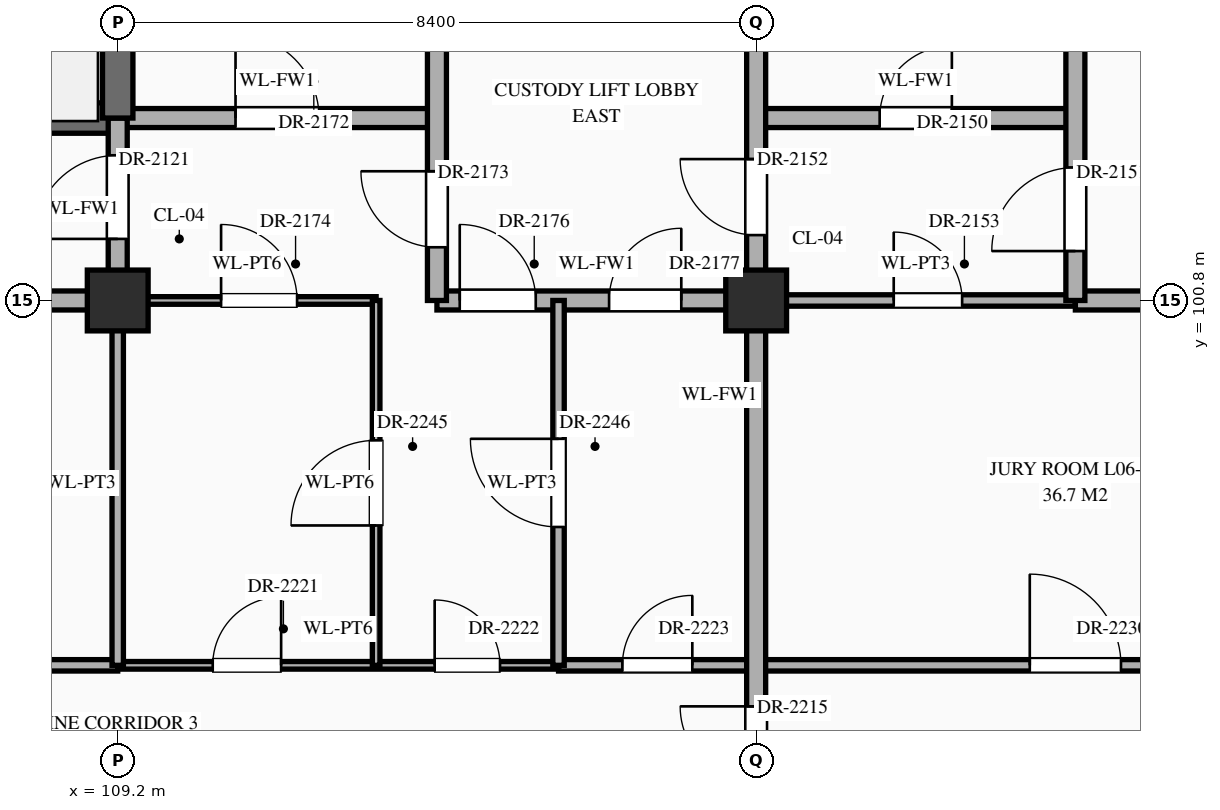
"""IFC4 building model, lengths in metres.
Left out: names, types, materials, properties, quantities, classifications, styles, units other than length and angle.
Written with IfcOpenShell. Run it as: python <this file> out.ifc"""

import sys

from ifc_helpers import new_model, si_unit, direction, frame, frame_2d, origin, origin_2d, place, context, subcontext, project, spatial, rectangle, extrude, element, fill, save


model = new_model("IFC4")
c1 = context("Model", 3, precision=1e-05, world=origin(), true_north=direction((0.0, 1.0)))
c2 = subcontext(c1, "Body", "Model", "MODEL_VIEW")
j1 = project(units=[si_unit("LENGTHUNIT", "METRE"), si_unit("PLANEANGLEUNIT", "RADIAN")], contexts=[c1])
p1 = place(None, origin())
s1 = spatial("IfcSite", under=j1, at=p1, CompositionType="ELEMENT")
p2 = place(p1, origin())
s2 = spatial("IfcBuilding", under=s1, at=p2, CompositionType="ELEMENT")
p3 = place(p2, frame((0.0, 0.0, 26.1)))
s3 = spatial("IfcBuildingStorey", under=s2, at=p3, CompositionType="ELEMENT", Elevation=26.1)
for number, where, z_axis, x_axis in (
    (1, (109.2, 100.8, 0.0), (0.0, 0.0, 1.0), (1.0, 0.0, 0.0)),
    (2, (117.6, 100.8, 0.0), (0.0, 0.0, 1.0), (1.0, 0.0, 0.0)),
):
    element("IfcColumn", number, at=place(p3, frame(where, z_axis=z_axis, x_axis=x_axis)), inside=s3, PredefinedType="COLUMN", context=c2, shape_type="SweptSolid", body=[
        extrude(rectangle(XDim=0.8, YDim=0.8, at=origin_2d()), origin(), (0.0, 0.0, 1.0), 4.5),
    ])
p4 = place(p3, frame((89.8, 96.0, 0.0), z_axis=(0.0, 0.0, 1.0), x_axis=(1.0, 0.0, 0.0)))
e3 = element("IfcWall", 3, at=p4, inside=s3, PredefinedType="STANDARD", context=c2, shape_type="SweptSolid", body=[
    extrude(rectangle(XDim=19.4, YDim=0.15, at=frame_2d((9.7, 0.0))), origin(), (0.0, 0.0, 1.0), 4.24),
])
p5 = place(p4, frame((0.79, 0.0, 0.0)))
e4 = element("IfcOpeningElement", 4, at=p5, cuts=e3, PredefinedType="OPENING", context=c2, shape_type="SweptSolid", body=[
    extrude(rectangle(XDim=1.02, YDim=2.4, at=frame_2d((0.51, 1.2))), frame((0.0, 0.087, 0.0), z_axis=(0.0, -1.0, 0.0), x_axis=(1.0, 0.0, 0.0)), (0.0, 0.0, 1.0), 0.174),
])
p6 = place(p4, frame((6.27, 0.0, 0.0)))
e5 = element("IfcOpeningElement", 5, at=p6, cuts=e3, PredefinedType="OPENING", context=c2, shape_type="SweptSolid", body=[
    extrude(rectangle(XDim=1.06, YDim=2.4, at=frame_2d((0.53, 1.2))), frame((0.0, 0.087, 0.0), z_axis=(0.0, -1.0, 0.0), x_axis=(1.0, 0.0, 0.0)), (0.0, 0.0, 1.0), 0.174),
])
p7 = place(p4, frame((14.63, 0.0, 0.0)))
e6 = element("IfcOpeningElement", 6, at=p7, cuts=e3, PredefinedType="OPENING", context=c2, shape_type="SweptSolid", body=[
    extrude(rectangle(XDim=1.14, YDim=2.4, at=frame_2d((0.57, 1.2))), frame((0.0, 0.087, 0.0), z_axis=(0.0, -1.0, 0.0), x_axis=(1.0, 0.0, 0.0)), (0.0, 0.0, 1.0), 0.174),
])
p8 = place(p3, frame((109.2, 96.0, 0.0), z_axis=(0.0, 0.0, 1.0), x_axis=(1.0, 0.0, 0.0)))
e7 = element("IfcWall", 7, at=p8, inside=s3, PredefinedType="STANDARD", context=c2, shape_type="SweptSolid", body=[
    extrude(rectangle(XDim=5.8, YDim=0.1, at=frame_2d((2.9, 0.0))), origin(), (0.0, 0.0, 1.0), 4.24),
])
p9 = place(p8, frame((1.25, 0.0, 0.0)))
e8 = element("IfcOpeningElement", 8, at=p9, cuts=e7, PredefinedType="OPENING", context=c2, shape_type="SweptSolid", body=[
    extrude(rectangle(XDim=0.9, YDim=2.15, at=frame_2d((0.45, 1.075))), frame((0.0, 0.062, 0.0), z_axis=(0.0, -1.0, 0.0), x_axis=(1.0, 0.0, 0.0)), (0.0, 0.0, 1.0), 0.124),
])
p10 = place(p8, frame((4.17, 0.0, 0.0)))
e9 = element("IfcOpeningElement", 9, at=p10, cuts=e7, PredefinedType="OPENING", context=c2, shape_type="SweptSolid", body=[
    extrude(rectangle(XDim=0.86, YDim=2.1, at=frame_2d((0.43, 1.05))), frame((0.0, 0.062, 0.0), z_axis=(0.0, -1.0, 0.0), x_axis=(1.0, 0.0, 0.0)), (0.0, 0.0, 1.0), 0.124),
])
p11 = place(p3, frame((115.0, 96.0, 0.0), z_axis=(0.0, 0.0, 1.0), x_axis=(1.0, 0.0, 0.0)))
e10 = element("IfcWall", 10, at=p11, inside=s3, PredefinedType="STANDARD", context=c2, shape_type="SweptSolid", body=[
    extrude(rectangle(XDim=19.4, YDim=0.15, at=frame_2d((9.7, 0.0))), origin(), (0.0, 0.0, 1.0), 4.24),
])
p12 = place(p11, frame((0.84, 0.0, 0.0)))
e11 = element("IfcOpeningElement", 11, at=p12, cuts=e10, PredefinedType="OPENING", context=c2, shape_type="SweptSolid", body=[
    extrude(rectangle(XDim=0.92, YDim=2.15, at=frame_2d((0.46, 1.075))), frame((0.0, 0.087, 0.0), z_axis=(0.0, -1.0, 0.0), x_axis=(1.0, 0.0, 0.0)), (0.0, 0.0, 1.0), 0.174),
])
p13 = place(p11, frame((6.2, 0.0, 0.0)))
e12 = element("IfcOpeningElement", 12, at=p13, cuts=e10, PredefinedType="OPENING", context=c2, shape_type="SweptSolid", body=[
    extrude(rectangle(XDim=1.2, YDim=2.35, at=frame_2d((0.6, 1.175))), frame((0.0, 0.087, 0.0), z_axis=(0.0, -1.0, 0.0), x_axis=(1.0, 0.0, 0.0)), (0.0, 0.0, 1.0), 0.174),
])
p14 = place(p11, frame((14.58, 0.0, 0.0)))
e13 = element("IfcOpeningElement", 13, at=p14, cuts=e10, PredefinedType="OPENING", context=c2, shape_type="SweptSolid", body=[
    extrude(rectangle(XDim=1.24, YDim=2.3, at=frame_2d((0.62, 1.15))), frame((0.0, 0.087, 0.0), z_axis=(0.0, -1.0, 0.0), x_axis=(1.0, 0.0, 0.0)), (0.0, 0.0, 1.0), 0.174),
])
p15 = place(p3, frame((96.6, 100.8, 0.0), z_axis=(0.0, 0.0, 1.0), x_axis=(1.0, 0.0, 0.0)))
e14 = element("IfcWall", 14, at=p15, inside=s3, PredefinedType="STANDARD", context=c2, shape_type="SweptSolid", body=[
    extrude(rectangle(XDim=12.6, YDim=0.25, at=frame_2d((6.3, 0.0))), origin(), (0.0, 0.0, 1.0), 3.39),
])
p16 = place(p15, frame((7.9, 0.0, 0.0)))
e15 = element("IfcOpeningElement", 15, at=p16, cuts=e14, PredefinedType="OPENING", context=c2, shape_type="SweptSolid", body=[
    extrude(rectangle(XDim=1.0, YDim=2.2, at=frame_2d((0.5, 1.1))), frame((0.0, 0.137, 0.0), z_axis=(0.0, -1.0, 0.0), x_axis=(1.0, 0.0, 0.0)), (0.0, 0.0, 1.0), 0.274),
])
p17 = place(p3, frame((109.2, 100.8, 0.0), z_axis=(0.0, 0.0, 1.0), x_axis=(1.0, 0.0, 0.0)))
e16 = element("IfcWall", 16, at=p17, inside=s3, PredefinedType="STANDARD", context=c2, shape_type="SweptSolid", body=[
    extrude(rectangle(XDim=3.4, YDim=0.1, at=frame_2d((1.7, 0.0))), origin(), (0.0, 0.0, 1.0), 3.39),
])
p18 = place(p17, frame((1.36, 0.0, 0.0)))
e17 = element("IfcOpeningElement", 17, at=p18, cuts=e16, PredefinedType="OPENING", context=c2, shape_type="SweptSolid", body=[
    extrude(rectangle(XDim=1.0, YDim=2.25, at=frame_2d((0.5, 1.125))), frame((0.0, 0.062, 0.0), z_axis=(0.0, -1.0, 0.0), x_axis=(1.0, 0.0, 0.0)), (0.0, 0.0, 1.0), 0.124),
])
p19 = place(p3, frame((113.4, 100.8, 0.0), z_axis=(0.0, 0.0, 1.0), x_axis=(1.0, 0.0, 0.0)))
e18 = element("IfcWall", 18, at=p19, inside=s3, PredefinedType="STANDARD", context=c2, shape_type="SweptSolid", body=[
    extrude(rectangle(XDim=4.2, YDim=0.25, at=frame_2d((2.1, 0.0))), origin(), (0.0, 0.0, 1.0), 3.39),
])
p20 = place(p19, frame((0.3, 0.0, 0.0)))
e19 = element("IfcOpeningElement", 19, at=p20, cuts=e18, PredefinedType="OPENING", context=c2, shape_type="SweptSolid", body=[
    extrude(rectangle(XDim=1.0, YDim=2.2, at=frame_2d((0.5, 1.1))), frame((0.0, 0.137, 0.0), z_axis=(0.0, -1.0, 0.0), x_axis=(1.0, 0.0, 0.0)), (0.0, 0.0, 1.0), 0.274),
])
p21 = place(p19, frame((2.265, 0.0, 0.0)))
e20 = element("IfcOpeningElement", 20, at=p21, cuts=e18, PredefinedType="OPENING", context=c2, shape_type="SweptSolid", body=[
    extrude(rectangle(XDim=0.95, YDim=2.15, at=frame_2d((0.475, 1.075))), frame((0.0, 0.137, 0.0), z_axis=(0.0, -1.0, 0.0), x_axis=(1.0, 0.0, 0.0)), (0.0, 0.0, 1.0), 0.274),
])
p22 = place(p3, frame((117.6, 100.8, 0.0), z_axis=(0.0, 0.0, 1.0), x_axis=(1.0, 0.0, 0.0)))
e21 = element("IfcWall", 21, at=p22, inside=s3, PredefinedType="STANDARD", context=c2, shape_type="SweptSolid", body=[
    extrude(rectangle(XDim=4.2, YDim=0.15, at=frame_2d((2.1, 0.0))), origin(), (0.0, 0.0, 1.0), 3.39),
])
p23 = place(p22, frame((1.81, 0.0, 0.0)))
e22 = element("IfcOpeningElement", 22, at=p23, cuts=e21, PredefinedType="OPENING", context=c2, shape_type="SweptSolid", body=[
    extrude(rectangle(XDim=0.9, YDim=2.15, at=frame_2d((0.45, 1.075))), frame((0.0, 0.087, 0.0), z_axis=(0.0, -1.0, 0.0), x_axis=(1.0, 0.0, 0.0)), (0.0, 0.0, 1.0), 0.174),
])
p24 = place(p3, frame((121.8, 100.8, 0.0), z_axis=(0.0, 0.0, 1.0), x_axis=(1.0, 0.0, 0.0)))
e23 = element("IfcWall", 23, at=p24, inside=s3, PredefinedType="STANDARD", context=c2, shape_type="SweptSolid", body=[
    extrude(rectangle(XDim=4.2, YDim=0.25, at=frame_2d((2.1, 0.0))), origin(), (0.0, 0.0, 1.0), 3.39),
])
p25 = place(p3, frame((100.8, 103.2, 0.0), z_axis=(0.0, 0.0, 1.0), x_axis=(1.0, 0.0, 0.0)))
e24 = element("IfcWall", 24, at=p25, inside=s3, PredefinedType="SHEAR", context=c2, shape_type="SweptSolid", body=[
    extrude(rectangle(XDim=8.4, YDim=0.4, at=frame_2d((4.2, 0.0))), origin(), (0.0, 0.0, 1.0), 4.24),
])
p26 = place(p25, frame((0.65, 0.0, 0.0)))
e25 = element("IfcOpeningElement", 25, at=p26, cuts=e24, PredefinedType="OPENING", context=c2, shape_type="SweptSolid", body=[
    extrude(rectangle(XDim=1.1, YDim=2.2, at=frame_2d((0.55, 1.1))), frame((0.0, 0.212, 0.0), z_axis=(0.0, -1.0, 0.0), x_axis=(1.0, 0.0, 0.0)), (0.0, 0.0, 1.0), 0.424),
])
p27 = place(p3, frame((109.2, 103.2, 0.0), z_axis=(0.0, 0.0, 1.0), x_axis=(1.0, 0.0, 0.0)))
e26 = element("IfcWall", 26, at=p27, inside=s3, PredefinedType="STANDARD", context=c2, shape_type="SweptSolid", body=[
    extrude(rectangle(XDim=4.2, YDim=0.25, at=frame_2d((2.1, 0.0))), origin(), (0.0, 0.0, 1.0), 4.24),
])
p28 = place(p27, frame((1.55, 0.0, 0.0)))
e27 = element("IfcOpeningElement", 27, at=p28, cuts=e26, PredefinedType="OPENING", context=c2, shape_type="SweptSolid", body=[
    extrude(rectangle(XDim=1.1, YDim=2.2, at=frame_2d((0.55, 1.1))), frame((0.0, 0.137, 0.0), z_axis=(0.0, -1.0, 0.0), x_axis=(1.0, 0.0, 0.0)), (0.0, 0.0, 1.0), 0.274),
])
p29 = place(p3, frame((117.6, 103.2, 0.0), z_axis=(0.0, 0.0, 1.0), x_axis=(1.0, 0.0, 0.0)))
e28 = element("IfcWall", 28, at=p29, inside=s3, PredefinedType="STANDARD", context=c2, shape_type="SweptSolid", body=[
    extrude(rectangle(XDim=4.2, YDim=0.25, at=frame_2d((2.1, 0.0))), origin(), (0.0, 0.0, 1.0), 4.24),
])
p30 = place(p29, frame((1.625, 0.0, 0.0)))
e29 = element("IfcOpeningElement", 29, at=p30, cuts=e28, PredefinedType="OPENING", context=c2, shape_type="SweptSolid", body=[
    extrude(rectangle(XDim=0.95, YDim=2.15, at=frame_2d((0.475, 1.075))), frame((0.0, 0.137, 0.0), z_axis=(0.0, -1.0, 0.0), x_axis=(1.0, 0.0, 0.0)), (0.0, 0.0, 1.0), 0.274),
])
p31 = place(p3, frame((109.2, 96.0, 0.0), z_axis=(0.0, 0.0, 1.0), x_axis=(0.0, 1.0, 0.0)))
e30 = element("IfcWall", 30, at=p31, inside=s3, PredefinedType="STANDARD", context=c2, shape_type="SweptSolid", body=[
    extrude(rectangle(XDim=4.8, YDim=0.15, at=frame_2d((2.4, 0.0))), origin(), (0.0, 0.0, 1.0), 3.49),
])
p32 = place(p3, frame((109.2, 100.8, 0.0), z_axis=(0.0, 0.0, 1.0), x_axis=(0.0, 1.0, 0.0)))
e31 = element("IfcWall", 31, at=p32, inside=s3, PredefinedType="STANDARD", context=c2, shape_type="SweptSolid", body=[
    extrude(rectangle(XDim=2.4, YDim=0.25, at=frame_2d((1.2, 0.0))), origin(), (0.0, 0.0, 1.0), 3.49),
])
p33 = place(p32, frame((0.81, 0.0, 0.0)))
e32 = element("IfcOpeningElement", 32, at=p33, cuts=e31, PredefinedType="OPENING", context=c2, shape_type="SweptSolid", body=[
    extrude(rectangle(XDim=1.1, YDim=2.2, at=frame_2d((0.55, 1.1))), frame((0.0, 0.137, 0.0), z_axis=(0.0, -1.0, 0.0), x_axis=(1.0, 0.0, 0.0)), (0.0, 0.0, 1.0), 0.274),
])
p34 = place(p3, frame((109.2, 103.2, 0.0), z_axis=(0.0, 0.0, 1.0), x_axis=(0.0, 1.0, 0.0)))
e33 = element("IfcWall", 33, at=p34, inside=s3, PredefinedType="SHEAR", context=c2, shape_type="SweptSolid", body=[
    extrude(rectangle(XDim=4.8, YDim=0.4, at=frame_2d((2.4, 0.0))), origin(), (0.0, 0.0, 1.0), 4.24),
])
p35 = place(p3, frame((112.6, 96.0, 0.0), z_axis=(0.0, 0.0, 1.0), x_axis=(0.0, 1.0, 0.0)))
e34 = element("IfcWall", 34, at=p35, inside=s3, PredefinedType="STANDARD", context=c2, shape_type="SweptSolid", body=[
    extrude(rectangle(XDim=4.8, YDim=0.1, at=frame_2d((2.4, 0.0))), origin(), (0.0, 0.0, 1.0), 4.24),
])
p36 = place(p35, frame((1.84, 0.0, 0.0)))
e35 = element("IfcOpeningElement", 35, at=p36, cuts=e34, PredefinedType="OPENING", context=c2, shape_type="SweptSolid", body=[
    extrude(rectangle(XDim=1.12, YDim=2.25, at=frame_2d((0.56, 1.125))), frame((0.0, 0.062, 0.0), z_axis=(0.0, -1.0, 0.0), x_axis=(1.0, 0.0, 0.0)), (0.0, 0.0, 1.0), 0.124),
])
p37 = place(p3, frame((113.4, 100.8, 0.0), z_axis=(0.0, 0.0, 1.0), x_axis=(0.0, 1.0, 0.0)))
e36 = element("IfcWall", 36, at=p37, inside=s3, PredefinedType="STANDARD", context=c2, shape_type="SweptSolid", body=[
    extrude(rectangle(XDim=3.6, YDim=0.25, at=frame_2d((1.8, 0.0))), origin(), (0.0, 0.0, 1.0), 3.84),
])
p38 = place(p37, frame((0.7, 0.0, 0.0)))
e37 = element("IfcOpeningElement", 37, at=p38, cuts=e36, PredefinedType="OPENING", context=c2, shape_type="SweptSolid", body=[
    extrude(rectangle(XDim=1.0, YDim=2.2, at=frame_2d((0.5, 1.1))), frame((0.0, 0.137, 0.0), z_axis=(0.0, -1.0, 0.0), x_axis=(1.0, 0.0, 0.0)), (0.0, 0.0, 1.0), 0.274),
])
p39 = place(p3, frame((115.0, 96.0, 0.0), z_axis=(0.0, 0.0, 1.0), x_axis=(0.0, 1.0, 0.0)))
e38 = element("IfcWall", 38, at=p39, inside=s3, PredefinedType="STANDARD", context=c2, shape_type="SweptSolid", body=[
    extrude(rectangle(XDim=4.8, YDim=0.15, at=frame_2d((2.4, 0.0))), origin(), (0.0, 0.0, 1.0), 4.24),
])
p40 = place(p39, frame((1.82, 0.0, 0.0)))
e39 = element("IfcOpeningElement", 39, at=p40, cuts=e38, PredefinedType="OPENING", context=c2, shape_type="SweptSolid", body=[
    extrude(rectangle(XDim=1.16, YDim=2.3, at=frame_2d((0.58, 1.15))), frame((0.0, 0.087, 0.0), z_axis=(0.0, -1.0, 0.0), x_axis=(1.0, 0.0, 0.0)), (0.0, 0.0, 1.0), 0.174),
])
p41 = place(p3, frame((117.6, 91.2, 0.0), z_axis=(0.0, 0.0, 1.0), x_axis=(0.0, 1.0, 0.0)))
e40 = element("IfcWall", 40, at=p41, inside=s3, PredefinedType="STANDARD", context=c2, shape_type="SweptSolid", body=[
    extrude(rectangle(XDim=13.2, YDim=0.25, at=frame_2d((6.6, 0.0))), origin(), (0.0, 0.0, 1.0), 3.49),
])
p42 = place(p41, frame((0.49, 0.0, 0.0)))
e41 = element("IfcOpeningElement", 41, at=p42, cuts=e40, PredefinedType="OPENING", context=c2, shape_type="SweptSolid", body=[
    extrude(rectangle(XDim=1.1, YDim=2.2, at=frame_2d((0.55, 1.1))), frame((0.0, 0.137, 0.0), z_axis=(0.0, -1.0, 0.0), x_axis=(1.0, 0.0, 0.0)), (0.0, 0.0, 1.0), 0.274),
])
p43 = place(p41, frame((10.46, 0.0, 0.0)))
e42 = element("IfcOpeningElement", 42, at=p43, cuts=e40, PredefinedType="OPENING", context=c2, shape_type="SweptSolid", body=[
    extrude(rectangle(XDim=1.0, YDim=2.2, at=frame_2d((0.5, 1.1))), frame((0.0, 0.137, 0.0), z_axis=(0.0, -1.0, 0.0), x_axis=(1.0, 0.0, 0.0)), (0.0, 0.0, 1.0), 0.274),
])
p44 = place(p41, frame((3.26, 0.0, 0.0)))
e43 = element("IfcOpeningElement", 43, at=p44, cuts=e40, PredefinedType="OPENING", context=c2, shape_type="SweptSolid", body=[
    extrude(rectangle(XDim=1.0, YDim=2.2, at=frame_2d((0.5, 1.1))), frame((0.0, 0.137, 0.0), z_axis=(0.0, -1.0, 0.0), x_axis=(1.0, 0.0, 0.0)), (0.0, 0.0, 1.0), 0.274),
])
p45 = place(p3, frame((121.8, 100.8, 0.0), z_axis=(0.0, 0.0, 1.0), x_axis=(0.0, 1.0, 0.0)))
e44 = element("IfcWall", 44, at=p45, inside=s3, PredefinedType="STANDARD", context=c2, shape_type="SweptSolid", body=[
    extrude(rectangle(XDim=3.6, YDim=0.25, at=frame_2d((1.8, 0.0))), origin(), (0.0, 0.0, 1.0), 3.89),
])
p46 = place(p45, frame((0.65, 0.0, 0.0)))
e45 = element("IfcOpeningElement", 45, at=p46, cuts=e44, PredefinedType="OPENING", context=c2, shape_type="SweptSolid", body=[
    extrude(rectangle(XDim=1.1, YDim=2.2, at=frame_2d((0.55, 1.1))), frame((0.0, 0.137, 0.0), z_axis=(0.0, -1.0, 0.0), x_axis=(1.0, 0.0, 0.0)), (0.0, 0.0, 1.0), 0.274),
])
p47 = place(p33, origin())
e46 = element("IfcDoor", 46, at=p47, inside=s3, OperationType="SINGLE_SWING_LEFT", PredefinedType="DOOR", context=c2, shape_type="SweptSolid", body=[
    extrude(rectangle(XDim=1.1, YDim=2.2, at=frame_2d((0.55, 1.1))), frame((0.0, 0.025, 0.0), z_axis=(0.0, -1.0, 0.0), x_axis=(1.0, 0.0, 0.0)), (0.0, 0.0, 1.0), 0.05),
])
fill(e32, e46)
p48 = place(p30, origin())
e47 = element("IfcDoor", 47, at=p48, inside=s3, OperationType="SINGLE_SWING_RIGHT", PredefinedType="DOOR", context=c2, shape_type="SweptSolid", body=[
    extrude(rectangle(XDim=0.95, YDim=2.15, at=frame_2d((0.475, 1.075))), frame((0.0, 0.025, 0.0), z_axis=(0.0, -1.0, 0.0), x_axis=(1.0, 0.0, 0.0)), (0.0, 0.0, 1.0), 0.05),
])
fill(e29, e47)
p49 = place(p46, origin())
e48 = element("IfcDoor", 48, at=p49, inside=s3, OperationType="SINGLE_SWING_LEFT", PredefinedType="DOOR", context=c2, shape_type="SweptSolid", body=[
    extrude(rectangle(XDim=1.1, YDim=2.2, at=frame_2d((0.55, 1.1))), frame((0.0, 0.025, 0.0), z_axis=(0.0, -1.0, 0.0), x_axis=(1.0, 0.0, 0.0)), (0.0, 0.0, 1.0), 0.05),
])
fill(e45, e48)
p50 = place(p43, origin())
e49 = element("IfcDoor", 49, at=p50, inside=s3, OperationType="SINGLE_SWING_RIGHT", PredefinedType="DOOR", context=c2, shape_type="SweptSolid", body=[
    extrude(rectangle(XDim=1.0, YDim=2.2, at=frame_2d((0.5, 1.1))), frame((0.0, 0.025, 0.0), z_axis=(0.0, -1.0, 0.0), x_axis=(1.0, 0.0, 0.0)), (0.0, 0.0, 1.0), 0.05),
])
fill(e42, e49)
p51 = place(p23, origin())
e50 = element("IfcDoor", 50, at=p51, inside=s3, OperationType="SINGLE_SWING_LEFT", PredefinedType="DOOR", context=c2, shape_type="SweptSolid", body=[
    extrude(rectangle(XDim=0.9, YDim=2.15, at=frame_2d((0.45, 1.075))), frame((0.0, 0.025, 0.0), z_axis=(0.0, -1.0, 0.0), x_axis=(1.0, 0.0, 0.0)), (0.0, 0.0, 1.0), 0.05),
])
fill(e22, e50)
p52 = place(p28, origin())
e51 = element("IfcDoor", 51, at=p52, inside=s3, OperationType="SINGLE_SWING_LEFT", PredefinedType="DOOR", context=c2, shape_type="SweptSolid", body=[
    extrude(rectangle(XDim=1.1, YDim=2.2, at=frame_2d((0.55, 1.1))), frame((0.0, 0.025, 0.0), z_axis=(0.0, -1.0, 0.0), x_axis=(1.0, 0.0, 0.0)), (0.0, 0.0, 1.0), 0.05),
])
fill(e27, e51)
p53 = place(p38, origin())
e52 = element("IfcDoor", 52, at=p53, inside=s3, OperationType="SINGLE_SWING_RIGHT", PredefinedType="DOOR", context=c2, shape_type="SweptSolid", body=[
    extrude(rectangle(XDim=1.0, YDim=2.2, at=frame_2d((0.5, 1.1))), frame((0.0, 0.025, 0.0), z_axis=(0.0, -1.0, 0.0), x_axis=(1.0, 0.0, 0.0)), (0.0, 0.0, 1.0), 0.05),
])
fill(e37, e52)
p54 = place(p18, origin())
e53 = element("IfcDoor", 53, at=p54, inside=s3, OperationType="SINGLE_SWING_LEFT", PredefinedType="DOOR", context=c2, shape_type="SweptSolid", body=[
    extrude(rectangle(XDim=1.0, YDim=2.25, at=frame_2d((0.5, 1.125))), frame((0.0, 0.025, 0.0), z_axis=(0.0, -1.0, 0.0), x_axis=(1.0, 0.0, 0.0)), (0.0, 0.0, 1.0), 0.05),
])
fill(e17, e53)
p55 = place(p20, origin())
e54 = element("IfcDoor", 54, at=p55, inside=s3, OperationType="SINGLE_SWING_LEFT", PredefinedType="DOOR", context=c2, shape_type="SweptSolid", body=[
    extrude(rectangle(XDim=1.0, YDim=2.2, at=frame_2d((0.5, 1.1))), frame((0.0, 0.025, 0.0), z_axis=(0.0, -1.0, 0.0), x_axis=(1.0, 0.0, 0.0)), (0.0, 0.0, 1.0), 0.05),
])
fill(e19, e54)
p56 = place(p21, origin())
e55 = element("IfcDoor", 55, at=p56, inside=s3, OperationType="SINGLE_SWING_RIGHT", PredefinedType="DOOR", context=c2, shape_type="SweptSolid", body=[
    extrude(rectangle(XDim=0.95, YDim=2.15, at=frame_2d((0.475, 1.075))), frame((0.0, 0.025, 0.0), z_axis=(0.0, -1.0, 0.0), x_axis=(1.0, 0.0, 0.0)), (0.0, 0.0, 1.0), 0.05),
])
fill(e20, e55)
p57 = place(p44, origin())
e56 = element("IfcDoor", 56, at=p57, inside=s3, OperationType="SINGLE_SWING_RIGHT", PredefinedType="DOOR", context=c2, shape_type="SweptSolid", body=[
    extrude(rectangle(XDim=1.0, YDim=2.2, at=frame_2d((0.5, 1.1))), frame((0.0, 0.025, 0.0), z_axis=(0.0, -1.0, 0.0), x_axis=(1.0, 0.0, 0.0)), (0.0, 0.0, 1.0), 0.05),
])
fill(e43, e56)
p58 = place(p9, origin())
e57 = element("IfcDoor", 57, at=p58, inside=s3, OperationType="SINGLE_SWING_RIGHT", PredefinedType="DOOR", context=c2, shape_type="SweptSolid", body=[
    extrude(rectangle(XDim=0.9, YDim=2.15, at=frame_2d((0.45, 1.075))), frame((0.0, 0.025, 0.0), z_axis=(0.0, -1.0, 0.0), x_axis=(1.0, 0.0, 0.0)), (0.0, 0.0, 1.0), 0.05),
])
fill(e8, e57)
p59 = place(p10, origin())
e58 = element("IfcDoor", 58, at=p59, inside=s3, OperationType="SINGLE_SWING_LEFT", PredefinedType="DOOR", context=c2, shape_type="SweptSolid", body=[
    extrude(rectangle(XDim=0.86, YDim=2.1, at=frame_2d((0.43, 1.05))), frame((0.0, 0.025, 0.0), z_axis=(0.0, -1.0, 0.0), x_axis=(1.0, 0.0, 0.0)), (0.0, 0.0, 1.0), 0.05),
])
fill(e9, e58)
p60 = place(p12, origin())
e59 = element("IfcDoor", 59, at=p60, inside=s3, OperationType="SINGLE_SWING_RIGHT", PredefinedType="DOOR", context=c2, shape_type="SweptSolid", body=[
    extrude(rectangle(XDim=0.92, YDim=2.15, at=frame_2d((0.46, 1.075))), frame((0.0, 0.025, 0.0), z_axis=(0.0, -1.0, 0.0), x_axis=(1.0, 0.0, 0.0)), (0.0, 0.0, 1.0), 0.05),
])
fill(e11, e59)
p61 = place(p13, origin())
e60 = element("IfcDoor", 60, at=p61, inside=s3, OperationType="SINGLE_SWING_LEFT", PredefinedType="DOOR", context=c2, shape_type="SweptSolid", body=[
    extrude(rectangle(XDim=1.2, YDim=2.35, at=frame_2d((0.6, 1.175))), frame((0.0, 0.025, 0.0), z_axis=(0.0, -1.0, 0.0), x_axis=(1.0, 0.0, 0.0)), (0.0, 0.0, 1.0), 0.05),
])
fill(e12, e60)
p62 = place(p36, origin())
e61 = element("IfcDoor", 61, at=p62, inside=s3, OperationType="SINGLE_SWING_LEFT", PredefinedType="DOOR", context=c2, shape_type="SweptSolid", body=[
    extrude(rectangle(XDim=1.12, YDim=2.25, at=frame_2d((0.56, 1.125))), frame((0.0, 0.025, 0.0), z_axis=(0.0, -1.0, 0.0), x_axis=(1.0, 0.0, 0.0)), (0.0, 0.0, 1.0), 0.05),
])
fill(e35, e61)
p63 = place(p40, origin())
e62 = element("IfcDoor", 62, at=p63, inside=s3, OperationType="SINGLE_SWING_RIGHT", PredefinedType="DOOR", context=c2, shape_type="SweptSolid", body=[
    extrude(rectangle(XDim=1.16, YDim=2.3, at=frame_2d((0.58, 1.15))), frame((0.0, 0.025, 0.0), z_axis=(0.0, -1.0, 0.0), x_axis=(1.0, 0.0, 0.0)), (0.0, 0.0, 1.0), 0.05),
])
fill(e39, e62)
save(model, sys.argv[1])
